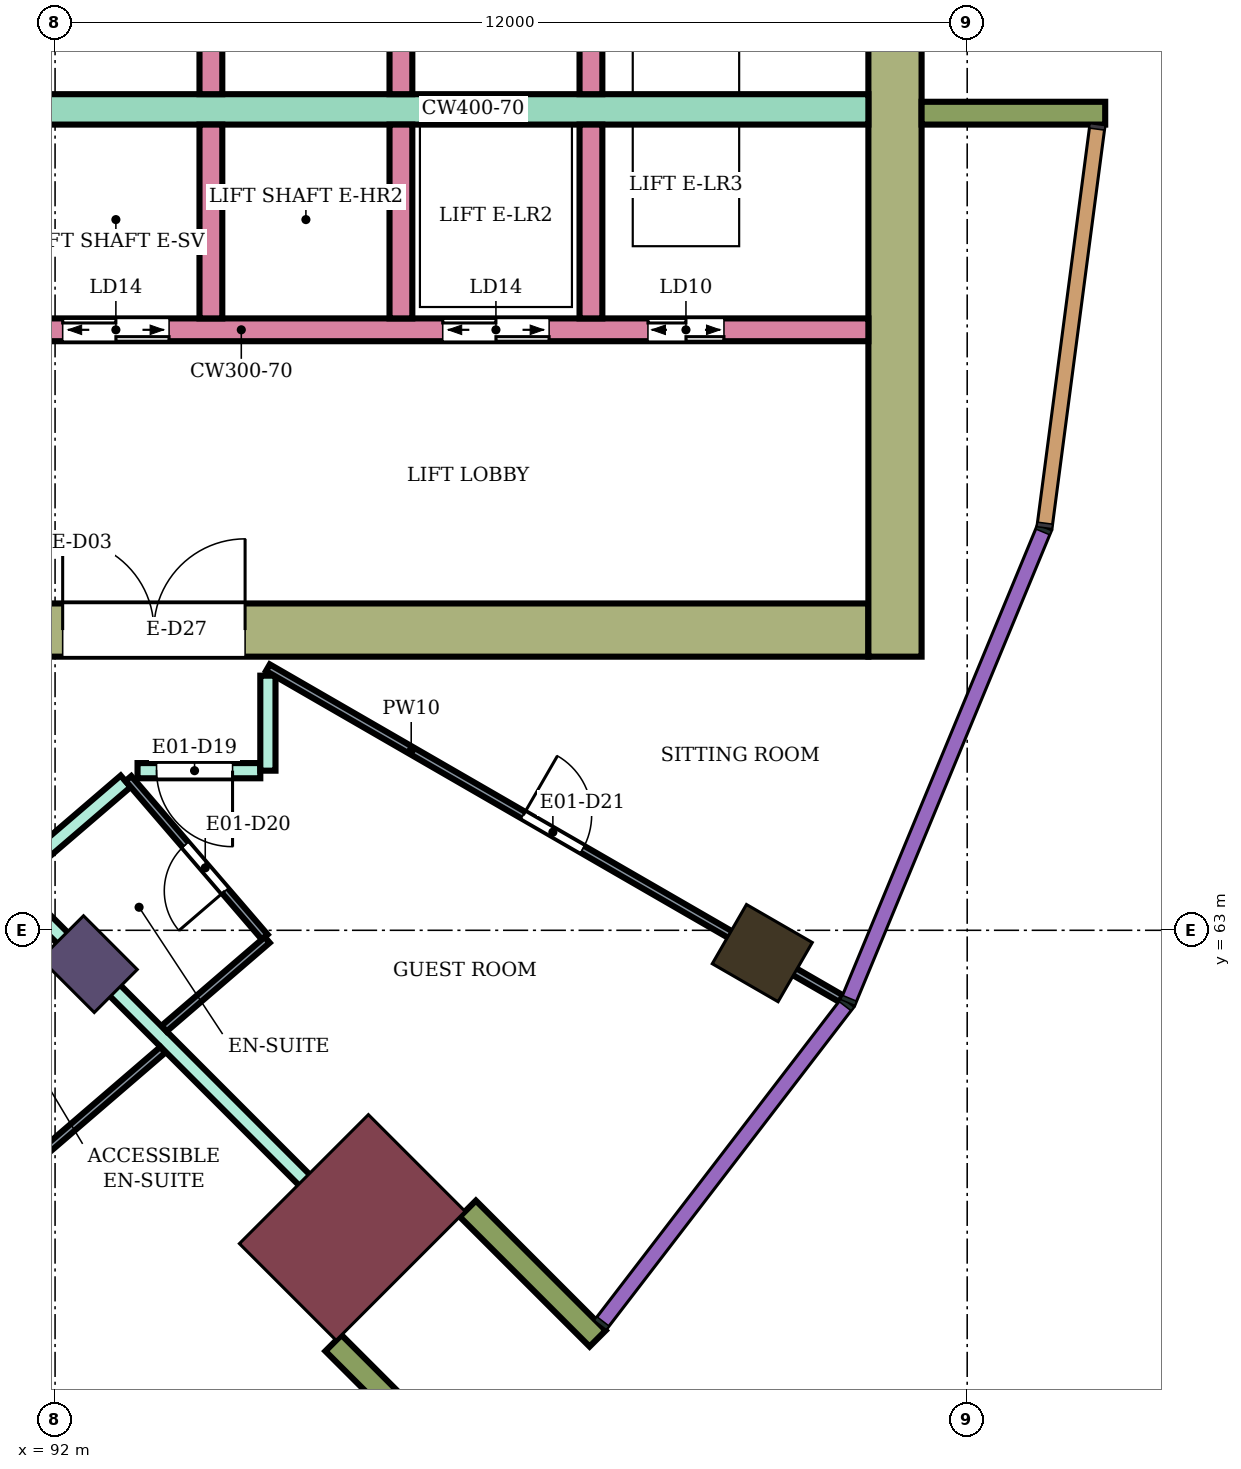
"""IFC4 building model, lengths in metres.
Left out: names, types, materials, properties, quantities, classifications, styles, units other than length and angle.
Written with IfcOpenShell. Run it as: python <this file> out.ifc"""

import sys

from ifc_helpers import new_model, si_unit, direction, frame, frame_2d, origin, origin_2d, place, context, subcontext, project, spatial, rectangle, extrude, element, fill, save


model = new_model("IFC4")
c1 = context("Model", 3, precision=1e-05, world=origin(), true_north=direction((0.0, 1.0)))
c2 = subcontext(c1, "Body", "Model", "MODEL_VIEW")
j1 = project(units=[si_unit("LENGTHUNIT", "METRE"), si_unit("PLANEANGLEUNIT", "RADIAN")], contexts=[c1])
p1 = place(None, origin())
s1 = spatial("IfcSite", under=j1, at=p1, CompositionType="ELEMENT")
p2 = place(p1, origin())
s2 = spatial("IfcBuilding", under=s1, at=p2, CompositionType="ELEMENT")
p3 = place(p2, frame((0.0, 0.0, 118.5)))
s3 = spatial("IfcBuildingStorey", under=s2, at=p3, CompositionType="ELEMENT", Elevation=118.5)
p4 = place(p3, frame((101.304, 62.7, 0.0), z_axis=(0.0, 0.0, 1.0), x_axis=(0.866025403784, -0.5, 0.0)))
e1 = element("IfcColumn", 1, at=p4, inside=s3, PredefinedType="COLUMN", context=c2, shape_type="SweptSolid", body=[
    extrude(rectangle(XDim=1.0, YDim=0.9, at=origin_2d()), origin(), (0.0, 0.0, 1.0), 3.9),
])
p5 = place(p3, frame((92.445, 62.555, 0.0), z_axis=(0.0, 0.0, 1.0), x_axis=(0.707106781187, -0.707106781187, 0.0)))
e2 = element("IfcColumn", 2, at=p5, inside=s3, PredefinedType="COLUMN", context=c2, shape_type="SweptSolid", body=[
    extrude(rectangle(XDim=1.0, YDim=0.8, at=origin_2d()), origin(), (0.0, 0.0, 1.0), 3.9),
])
p6 = place(p3, frame((95.91, 59.09, 0.0), z_axis=(0.0, 0.0, 1.0), x_axis=(0.707106781187, -0.707106781187, 0.0)))
e3 = element("IfcColumn", 3, at=p6, inside=s3, PredefinedType="COLUMN", context=c2, shape_type="SweptSolid", body=[
    extrude(rectangle(XDim=1.8, YDim=2.4, at=origin_2d()), origin(), (0.0, 0.0, 1.0), 3.9),
])
p7 = place(p3, frame((87.9, 66.95, 0.0), z_axis=(0.0, 0.0, 1.0), x_axis=(1.0, 0.0, 0.0)))
e4 = element("IfcWall", 4, at=p7, inside=s3, PredefinedType="SHEAR", context=c2, shape_type="SweptSolid", body=[
    extrude(rectangle(XDim=14.8, YDim=0.7, at=frame_2d((7.4, 0.0))), origin(), (0.0, 0.0, 1.0), 3.58),
])
p8 = place(p7, frame((4.2, 0.0, 0.0)))
e5 = element("IfcOpeningElement", 5, at=p8, cuts=e4, PredefinedType="OPENING", context=c2, shape_type="SweptSolid", body=[
    extrude(rectangle(XDim=2.4, YDim=2.4, at=frame_2d((1.2, 1.2))), frame((0.0, 0.36, 0.0), z_axis=(0.0, -1.0, 0.0), x_axis=(1.0, 0.0, 0.0)), (0.0, 0.0, 1.0), 0.72),
])
p9 = place(p3, frame((103.05, 66.6, 0.0), z_axis=(0.0, 0.0, 1.0), x_axis=(0.0, 1.0, 0.0)))
e6 = element("IfcWall", 6, at=p9, inside=s3, PredefinedType="SHEAR", context=c2, shape_type="SweptSolid", body=[
    extrude(rectangle(XDim=16.8, YDim=0.7, at=frame_2d((8.4, 0.0))), origin(), (0.0, 0.0, 1.0), 3.58),
])
p10 = place(p3, frame((91.7, 73.8, 0.0), z_axis=(0.0, 0.0, 1.0), x_axis=(1.0, 0.0, 0.0)))
e7 = element("IfcWall", 7, at=p10, inside=s3, PredefinedType="SHEAR", context=c2, shape_type="SweptSolid", body=[
    extrude(rectangle(XDim=11.0, YDim=0.4, at=frame_2d((5.5, 0.0))), origin(), (0.0, 0.0, 1.0), 3.58),
])
p11 = place(p3, frame((91.7, 70.9, 0.0), z_axis=(0.0, 0.0, 1.0), x_axis=(1.0, 0.0, 0.0)))
e8 = element("IfcWall", 8, at=p11, inside=s3, PredefinedType="SHEAR", context=c2, shape_type="SweptSolid", body=[
    extrude(rectangle(XDim=11.0, YDim=0.3, at=frame_2d((5.5, 0.0))), origin(), (0.0, 0.0, 1.0), 3.58),
])
p12 = place(p11, frame((0.4, 0.0, 0.0)))
e9 = element("IfcOpeningElement", 9, at=p12, cuts=e8, PredefinedType="OPENING", context=c2, shape_type="SweptSolid", body=[
    extrude(rectangle(XDim=1.4, YDim=2.1, at=frame_2d((0.7, 1.05))), frame((0.0, 0.16, 0.0), z_axis=(0.0, -1.0, 0.0), x_axis=(1.0, 0.0, 0.0)), (0.0, 0.0, 1.0), 0.32),
])
p13 = place(p11, frame((5.4, 0.0, 0.0)))
e10 = element("IfcOpeningElement", 10, at=p13, cuts=e8, PredefinedType="OPENING", context=c2, shape_type="SweptSolid", body=[
    extrude(rectangle(XDim=1.4, YDim=2.1, at=frame_2d((0.7, 1.05))), frame((0.0, 0.16, 0.0), z_axis=(0.0, -1.0, 0.0), x_axis=(1.0, 0.0, 0.0)), (0.0, 0.0, 1.0), 0.32),
])
p14 = place(p11, frame((8.1, 0.0, 0.0)))
e11 = element("IfcOpeningElement", 11, at=p14, cuts=e8, PredefinedType="OPENING", context=c2, shape_type="SweptSolid", body=[
    extrude(rectangle(XDim=1.0, YDim=2.1, at=frame_2d((0.5, 1.05))), frame((0.0, 0.16, 0.0), z_axis=(0.0, -1.0, 0.0), x_axis=(1.0, 0.0, 0.0)), (0.0, 0.0, 1.0), 0.32),
])
for number, where, z_axis, x_axis in (
    (12, (94.05, 74.0, 0.0), (0.0, 0.0, 1.0), (0.0, 1.0, 0.0)),
    (13, (96.55, 74.0, 0.0), (0.0, 0.0, 1.0), (0.0, 1.0, 0.0)),
    (14, (99.05, 74.0, 0.0), (0.0, 0.0, 1.0), (0.0, 1.0, 0.0)),
    (15, (94.05, 71.05, 0.0), (0.0, 0.0, 1.0), (0.0, 1.0, 0.0)),
    (16, (96.55, 71.05, 0.0), (0.0, 0.0, 1.0), (0.0, 1.0, 0.0)),
    (17, (99.05, 71.05, 0.0), (0.0, 0.0, 1.0), (0.0, 1.0, 0.0)),
):
    element("IfcWall", number, at=place(p3, frame(where, z_axis=z_axis, x_axis=x_axis)), inside=s3, PredefinedType="SHEAR", context=c2, shape_type="SweptSolid", body=[
        extrude(rectangle(XDim=2.55, YDim=0.3, at=frame_2d((1.275, 0.0))), origin(), (0.0, 0.0, 1.0), 3.58),
    ])
for number, where, z_axis, x_axis in (
    (18, (103.4, 73.75, 0.0), (0.0, 0.0, 1.0), (1.0, 0.0, 0.0)),
    (19, (95.662, 57.57, 0.0), (0.0, 0.0, 1.0), (0.707, -0.707, 0.0)),
    (20, (97.43, 59.338, 0.0), (0.0, 0.0, 1.0), (0.707, -0.707, 0.0)),
):
    element("IfcWall", number, at=place(p3, frame(where, z_axis=z_axis, x_axis=x_axis)), inside=s3, PredefinedType="NOTDEFINED", context=c2, shape_type="SweptSolid", body=[
        extrude(rectangle(XDim=2.416, YDim=0.3, at=frame_2d((1.208, 0.0))), origin(), (0.0, 0.0, 1.0), 3.9),
    ])
p15 = place(p3, frame((88.235, 60.931, 0.0), z_axis=(0.0, 0.0, 1.0), x_axis=(0.758816241808, 0.651304775945, 0.0)))
e21 = element("IfcWall", 21, at=p15, inside=s3, PredefinedType="PARTITIONING", context=c2, shape_type="SweptSolid", body=[
    extrude(rectangle(XDim=6.186, YDim=0.2, at=frame_2d((3.093, 0.0))), origin(), (0.0, 0.0, 1.0), 3.45),
])
p16 = place(p15, frame((0.308, 0.0, 0.0)))
e22 = element("IfcOpeningElement", 22, at=p16, cuts=e21, PredefinedType="OPENING", context=c2, shape_type="SweptSolid", body=[
    extrude(rectangle(XDim=1.1, YDim=2.1, at=frame_2d((0.55, 1.05))), frame((0.0, 0.11, 0.0), z_axis=(0.0, -1.0, 0.0), x_axis=(1.0, 0.0, 0.0)), (0.0, 0.0, 1.0), 0.22),
])
p17 = place(p3, frame((88.159, 60.863, 0.0), z_axis=(0.0, 0.0, 1.0), x_axis=(0.499935840196, -0.866062443296, 0.0)))
e23 = element("IfcWall", 23, at=p17, inside=s3, PredefinedType="PARTITIONING", context=c2, shape_type="SweptSolid", body=[
    extrude(rectangle(XDim=9.475, YDim=0.2, at=frame_2d((4.737, 0.0))), origin(), (0.0, 0.0, 1.0), 3.45),
])
p18 = place(p3, frame((91.449, 63.548, 0.0), z_axis=(0.0, 0.0, 1.0), x_axis=(0.706984804638, -0.707228736698, 0.0)))
e24 = element("IfcWall", 24, at=p18, inside=s3, PredefinedType="PARTITIONING", context=c2, shape_type="SweptSolid", body=[
    extrude(rectangle(XDim=7.006, YDim=0.2, at=frame_2d((3.503, 0.0))), origin(), (0.0, 0.0, 1.0), 3.45),
])
p19 = place(p3, frame((93.085, 65.1, 0.0), z_axis=(0.0, 0.0, 1.0), x_axis=(1.0, 0.0, 0.0)))
e25 = element("IfcWall", 25, at=p19, inside=s3, PredefinedType="PARTITIONING", context=c2, shape_type="SweptSolid", body=[
    extrude(rectangle(XDim=1.615, YDim=0.2, at=frame_2d((0.808, 0.0))), origin(), (0.0, 0.0, 1.0), 3.45),
])
p20 = place(p19, frame((0.25, 0.0, 0.0)))
e26 = element("IfcOpeningElement", 26, at=p20, cuts=e25, PredefinedType="OPENING", context=c2, shape_type="SweptSolid", body=[
    extrude(rectangle(XDim=1.0, YDim=2.1, at=frame_2d((0.5, 1.05))), frame((0.0, 0.11, 0.0), z_axis=(0.0, -1.0, 0.0), x_axis=(1.0, 0.0, 0.0)), (0.0, 0.0, 1.0), 0.22),
])
p21 = place(p3, frame((94.8, 65.1, 0.0), z_axis=(0.0, 0.0, 1.0), x_axis=(0.0, 1.0, 0.0)))
e27 = element("IfcWall", 27, at=p21, inside=s3, PredefinedType="PARTITIONING", context=c2, shape_type="SweptSolid", body=[
    extrude(rectangle(XDim=1.25, YDim=0.2, at=frame_2d((0.625, 0.0))), origin(), (0.0, 0.0, 1.0), 3.45),
])
p22 = place(p3, frame((91.434, 59.722, 0.0), z_axis=(0.0, 0.0, 1.0), x_axis=(0.758076316785, 0.652165851552, 0.0)))
e28 = element("IfcWall", 28, at=p22, inside=s3, PredefinedType="PARTITIONING", context=c2, shape_type="SweptSolid", body=[
    extrude(rectangle(XDim=2.616, YDim=0.1, at=frame_2d((1.308, 0.0))), origin(), (0.0, 0.0, 1.0), 3.45),
])
p23 = place(p3, frame((92.965, 64.997, 0.0), z_axis=(0.0, 0.0, 1.0), x_axis=(0.652069888227, -0.758158862553, 0.0)))
e29 = element("IfcWall", 29, at=p23, inside=s3, PredefinedType="PARTITIONING", context=c2, shape_type="SweptSolid", body=[
    extrude(rectangle(XDim=2.75, YDim=0.1, at=frame_2d((1.375, 0.0))), origin(), (0.0, 0.0, 1.0), 3.45),
])
p24 = place(p23, frame((1.15, 0.0, 0.0)))
e30 = element("IfcOpeningElement", 30, at=p24, cuts=e29, PredefinedType="OPENING", context=c2, shape_type="SweptSolid", body=[
    extrude(rectangle(XDim=0.8, YDim=2.1, at=frame_2d((0.4, 1.05))), frame((0.0, 0.06, 0.0), z_axis=(0.0, -1.0, 0.0), x_axis=(1.0, 0.0, 0.0)), (0.0, 0.0, 1.0), 0.12),
])
p25 = place(p3, frame((93.435, 61.707, 0.0), z_axis=(0.0, 0.0, 1.0), x_axis=(0.758070495124, 0.652172618578, 0.0)))
e31 = element("IfcWall", 31, at=p25, inside=s3, PredefinedType="PARTITIONING", context=c2, shape_type="SweptSolid", body=[
    extrude(rectangle(XDim=1.789, YDim=0.1, at=frame_2d((0.895, 0.0))), origin(), (0.0, 0.0, 1.0), 3.45),
])
p26 = place(p3, frame((94.8, 66.455, 0.0), z_axis=(0.0, 0.0, 1.0), x_axis=(0.86602264145, -0.500004784474, 0.0)))
e32 = element("IfcWall", 32, at=p26, inside=s3, PredefinedType="PARTITIONING", context=c2, shape_type="SweptSolid", body=[
    extrude(rectangle(XDim=8.708, YDim=0.1, at=frame_2d((4.354, 0.0))), origin(), (0.0, 0.0, 1.0), 3.45),
])
p27 = place(p26, frame((3.879, 0.0, 0.0)))
e33 = element("IfcOpeningElement", 33, at=p27, cuts=e32, PredefinedType="OPENING", context=c2, shape_type="SweptSolid", body=[
    extrude(rectangle(XDim=0.9, YDim=2.1, at=frame_2d((0.45, 1.05))), frame((0.0, 0.06, 0.0), z_axis=(0.0, -1.0, 0.0), x_axis=(1.0, 0.0, 0.0)), (0.0, 0.0, 1.0), 0.12),
])
p28 = place(p20, frame((1.0, 0.0, 0.0), z_axis=(0.0, 0.0, 1.0), x_axis=(-1.0, 0.0, 0.0)))
e34 = element("IfcDoor", 34, at=p28, inside=s3, OperationType="SINGLE_SWING_LEFT", PredefinedType="DOOR", context=c2, shape_type="SweptSolid", body=[
    extrude(rectangle(XDim=1.0, YDim=2.1, at=frame_2d((0.5, 1.05))), frame((0.0, 0.025, 0.0), z_axis=(0.0, -1.0, 0.0), x_axis=(1.0, 0.0, 0.0)), (0.0, 0.0, 1.0), 0.05),
])
fill(e26, e34)
p29 = place(p24, frame((0.8, 0.0, 0.0), z_axis=(0.0, 0.0, 1.0), x_axis=(-1.0, 0.0, 0.0)))
e35 = element("IfcDoor", 35, at=p29, inside=s3, OperationType="SINGLE_SWING_LEFT", PredefinedType="DOOR", context=c2, shape_type="SweptSolid", body=[
    extrude(rectangle(XDim=0.8, YDim=2.1, at=frame_2d((0.4, 1.05))), frame((0.0, 0.025, 0.0), z_axis=(0.0, -1.0, 0.0), x_axis=(1.0, 0.0, 0.0)), (0.0, 0.0, 1.0), 0.05),
])
fill(e30, e35)
p30 = place(p27, origin())
e36 = element("IfcDoor", 36, at=p30, inside=s3, OperationType="SINGLE_SWING_LEFT", PredefinedType="DOOR", context=c2, shape_type="SweptSolid", body=[
    extrude(rectangle(XDim=0.9, YDim=2.1, at=frame_2d((0.45, 1.05))), frame((0.0, 0.025, 0.0), z_axis=(0.0, -1.0, 0.0), x_axis=(1.0, 0.0, 0.0)), (0.0, 0.0, 1.0), 0.05),
])
fill(e33, e36)
p31 = place(p12, origin())
e37 = element("IfcDoor", 37, at=p31, inside=s3, OperationType="DOUBLE_DOOR_SLIDING", PredefinedType="DOOR", context=c2, shape_type="SweptSolid", body=[
    extrude(rectangle(XDim=1.4, YDim=2.1, at=frame_2d((0.7, 1.05))), frame((0.0, 0.025, 0.0), z_axis=(0.0, -1.0, 0.0), x_axis=(1.0, 0.0, 0.0)), (0.0, 0.0, 1.0), 0.05),
])
fill(e9, e37)
p32 = place(p13, origin())
e38 = element("IfcDoor", 38, at=p32, inside=s3, OperationType="DOUBLE_DOOR_SLIDING", PredefinedType="DOOR", context=c2, shape_type="SweptSolid", body=[
    extrude(rectangle(XDim=1.4, YDim=2.1, at=frame_2d((0.7, 1.05))), frame((0.0, 0.025, 0.0), z_axis=(0.0, -1.0, 0.0), x_axis=(1.0, 0.0, 0.0)), (0.0, 0.0, 1.0), 0.05),
])
fill(e10, e38)
p33 = place(p14, origin())
e39 = element("IfcDoor", 39, at=p33, inside=s3, OperationType="DOUBLE_DOOR_SLIDING", PredefinedType="DOOR", context=c2, shape_type="SweptSolid", body=[
    extrude(rectangle(XDim=1.0, YDim=2.1, at=frame_2d((0.5, 1.05))), frame((0.0, 0.025, 0.0), z_axis=(0.0, -1.0, 0.0), x_axis=(1.0, 0.0, 0.0)), (0.0, 0.0, 1.0), 0.05),
])
fill(e11, e39)
p34 = place(p8, origin())
e40 = element("IfcDoor", 40, at=p34, inside=s3, OperationType="DOUBLE_DOOR_SINGLE_SWING", PredefinedType="DOOR", context=c2, shape_type="SweptSolid", body=[
    extrude(rectangle(XDim=2.4, YDim=2.4, at=frame_2d((1.2, 1.2))), frame((0.0, 0.025, 0.0), z_axis=(0.0, -1.0, 0.0), x_axis=(1.0, 0.0, 0.0)), (0.0, 0.0, 1.0), 0.05),
])
fill(e5, e40)
save(model, sys.argv[1])
